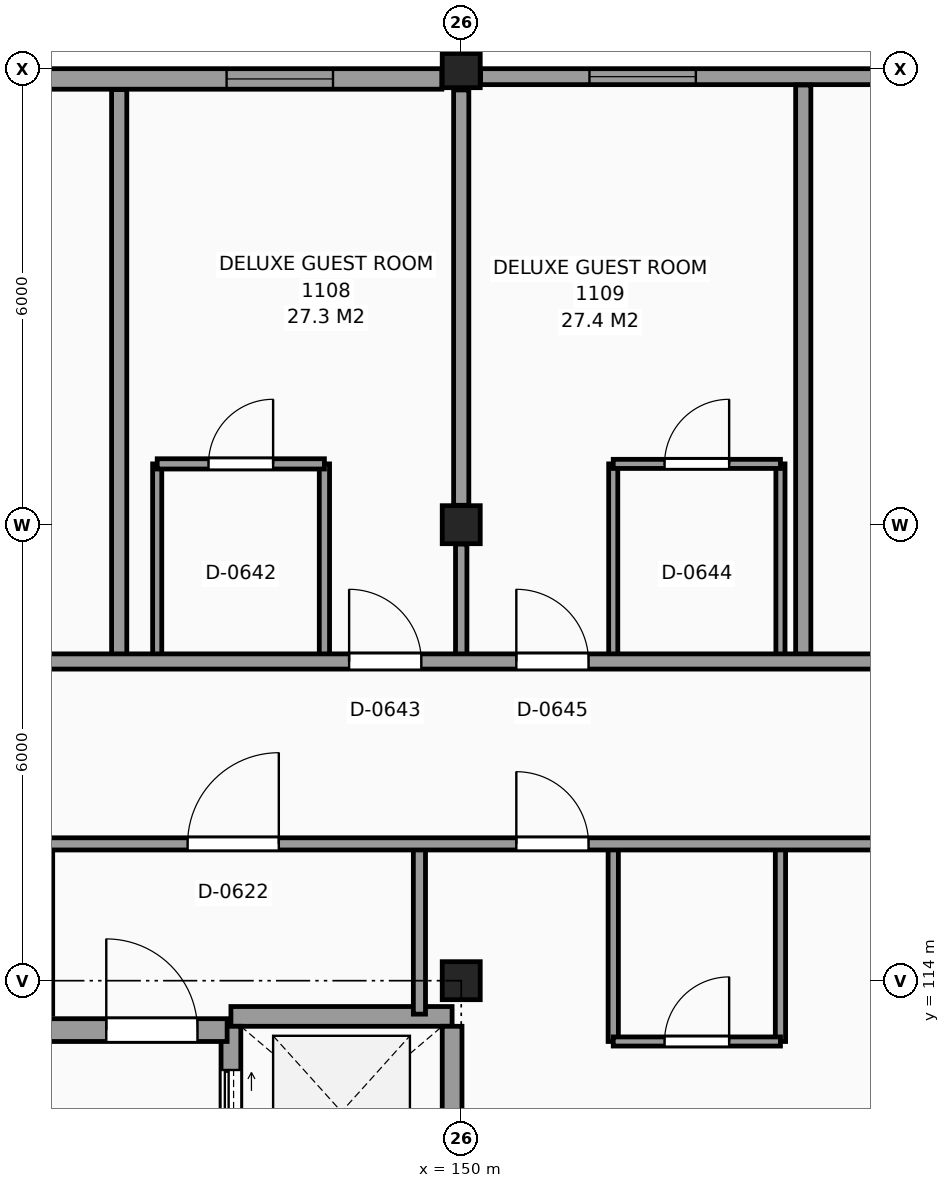
"""IFC4 building model, lengths in metres.
Left out: names, types, materials, properties, quantities, classifications, styles, units other than length and angle.
Written with IfcOpenShell. Run it as: python <this file> out.ifc"""

import sys

from ifc_helpers import new_model, si_unit, direction, frame, frame_2d, origin, origin_2d, place, context, subcontext, project, spatial, rectangle, extrude, element, fill, save


model = new_model("IFC4")
c1 = context("Model", 3, precision=1e-05, world=origin(), true_north=direction((0.0, 1.0)))
c2 = subcontext(c1, "Body", "Model", "MODEL_VIEW")
j1 = project(units=[si_unit("LENGTHUNIT", "METRE"), si_unit("PLANEANGLEUNIT", "RADIAN")], contexts=[c1])
p1 = place(None, origin())
s1 = spatial("IfcSite", under=j1, at=p1, CompositionType="ELEMENT")
p2 = place(p1, origin())
s2 = spatial("IfcBuilding", under=s1, at=p2, CompositionType="ELEMENT")
p3 = place(p2, frame((0.0, 0.0, 44.7)))
s3 = spatial("IfcBuildingStorey", under=s2, at=p3, CompositionType="ELEMENT", Elevation=44.7)
for number, where, z_axis, x_axis in (
    (1, (150.0, 114.0, 0.0), (0.0, 0.0, 1.0), (1.0, 0.0, 0.0)),
    (2, (150.0, 120.0, 0.0), (0.0, 0.0, 1.0), (1.0, 0.0, 0.0)),
    (3, (150.0, 126.0, 0.0), (0.0, 0.0, 1.0), (1.0, 0.0, 0.0)),
):
    element("IfcColumn", number, at=place(p3, frame(where, z_axis=z_axis, x_axis=x_axis)), inside=s3, PredefinedType="COLUMN", context=c2, shape_type="SweptSolid", body=[
        extrude(rectangle(XDim=0.5, YDim=0.5, at=origin_2d()), origin(), (0.0, 0.0, 1.0), 3.3),
    ])
p4 = place(p3, frame((155.745, 125.895, 0.0), z_axis=(0.0, 0.0, 1.0), x_axis=(-1.0, 0.0, 0.0)))
e4 = element("IfcWall", 4, at=p4, inside=s3, PredefinedType="SOLIDWALL", context=c2, shape_type="SweptSolid", body=[
    extrude(rectangle(XDim=5.49, YDim=0.21, at=frame_2d((2.745, 0.0))), origin(), (0.0, 0.0, 1.0), 2.4),
])
p5 = place(p4, frame((2.658, 0.0, 0.8)))
e5 = element("IfcOpeningElement", 5, at=p5, cuts=e4, PredefinedType="OPENING", context=c2, shape_type="SweptSolid", body=[
    extrude(rectangle(XDim=1.4, YDim=1.4, at=frame_2d((0.7, 0.7))), frame((0.0, 0.115, 0.0), z_axis=(0.0, -1.0, 0.0), x_axis=(1.0, 0.0, 0.0)), (0.0, 0.0, 1.0), 0.23),
])
p6 = place(p3, frame((149.745, 125.865, 0.0), z_axis=(0.0, 0.0, 1.0), x_axis=(-1.0, 0.0, 0.0)))
e6 = element("IfcWall", 6, at=p6, inside=s3, PredefinedType="SOLIDWALL", context=c2, shape_type="SweptSolid", body=[
    extrude(rectangle(XDim=5.49, YDim=0.27, at=frame_2d((2.745, 0.0))), origin(), (0.0, 0.0, 1.0), 2.4),
])
p7 = place(p6, frame((1.432, 0.0, 0.8)))
e7 = element("IfcOpeningElement", 7, at=p7, cuts=e6, PredefinedType="OPENING", context=c2, shape_type="SweptSolid", body=[
    extrude(rectangle(XDim=1.4, YDim=1.4, at=frame_2d((0.7, 0.7))), frame((0.0, 0.145, 0.0), z_axis=(0.0, -1.0, 0.0), x_axis=(1.0, 0.0, 0.0)), (0.0, 0.0, 1.0), 0.29),
])
p8 = place(p3, frame((146.97, 113.53, 0.0), z_axis=(0.0, 0.0, 1.0), x_axis=(1.0, 0.0, 0.0)))
e8 = element("IfcWall", 8, at=p8, inside=s3, PredefinedType="SHEAR", context=c2, shape_type="SweptSolid", body=[
    extrude(rectangle(XDim=2.91, YDim=0.26, at=frame_2d((1.455, 0.0))), origin(), (0.0, 0.0, 1.0), 3.3),
])
p9 = place(p3, frame((149.88, 111.15, 0.0), z_axis=(0.0, 0.0, 1.0), x_axis=(0.0, 1.0, 0.0)))
e9 = element("IfcWall", 9, at=p9, inside=s3, PredefinedType="SHEAR", context=c2, shape_type="SweptSolid", body=[
    extrude(rectangle(XDim=2.25, YDim=0.26, at=frame_2d((1.125, 0.0))), origin(), (0.0, 0.0, 1.0), 3.3),
])
p10 = place(p3, frame((146.97, 111.15, 0.0), z_axis=(0.0, 0.0, 1.0), x_axis=(0.0, 1.0, 0.0)))
e10 = element("IfcWall", 10, at=p10, inside=s3, PredefinedType="SHEAR", context=c2, shape_type="SweptSolid", body=[
    extrude(rectangle(XDim=2.25, YDim=0.26, at=frame_2d((1.125, 0.0))), origin(), (0.0, 0.0, 1.0), 3.3),
])
p11 = place(p10, frame((0.575, 0.0, 0.0)))
e11 = element("IfcOpeningElement", 11, at=p11, cuts=e10, PredefinedType="OPENING", context=c2, shape_type="SweptSolid", body=[
    extrude(rectangle(XDim=1.1, YDim=2.2, at=frame_2d((0.55, 1.1))), frame((0.0, 0.14, 0.0), z_axis=(0.0, -1.0, 0.0), x_axis=(1.0, 0.0, 0.0)), (0.0, 0.0, 1.0), 0.28),
])
p12 = place(p3, frame((142.68, 113.35, 0.0), z_axis=(0.0, 0.0, 1.0), x_axis=(1.0, 0.0, 0.0)))
e12 = element("IfcWall", 12, at=p12, inside=s3, PredefinedType="SHEAR", context=c2, shape_type="SweptSolid", body=[
    extrude(rectangle(XDim=4.24, YDim=0.3, at=frame_2d((2.12, 0.0))), origin(), (0.0, 0.0, 1.0), 3.3),
])
p13 = place(p12, frame((2.65, 0.0, 0.0)))
e13 = element("IfcOpeningElement", 13, at=p13, cuts=e12, PredefinedType="OPENING", context=c2, shape_type="SweptSolid", body=[
    extrude(rectangle(XDim=1.2, YDim=2.2, at=frame_2d((0.6, 1.1))), frame((0.0, 0.16, 0.0), z_axis=(0.0, -1.0, 0.0), x_axis=(1.0, 0.0, 0.0)), (0.0, 0.0, 1.0), 0.32),
])
p14 = place(p3, frame((144.55, 113.56, 0.0), z_axis=(0.0, 0.0, 1.0), x_axis=(0.0, 1.0, 0.0)))
e14 = element("IfcWall", 14, at=p14, inside=s3, PredefinedType="PARTITIONING", context=c2, shape_type="SweptSolid", body=[
    extrude(rectangle(XDim=2.24, YDim=0.15, at=frame_2d((1.12, 0.0))), origin(), (0.0, 0.0, 1.0), 3.05),
])
p15 = place(p3, frame((145.5, 118.2, 0.0), z_axis=(0.0, 0.0, 1.0), x_axis=(0.0, 1.0, 0.0)))
e15 = element("IfcWall", 15, at=p15, inside=s3, PredefinedType="PARTITIONING", context=c2, shape_type="SweptSolid", body=[
    extrude(rectangle(XDim=7.525, YDim=0.2, at=frame_2d((3.763, 0.0))), origin(), (0.0, 0.0, 1.0), 3.05),
])
p16 = place(p3, frame((146.0, 118.2, 0.0), z_axis=(0.0, 0.0, 1.0), x_axis=(0.0, 1.0, 0.0)))
e16 = element("IfcWall", 16, at=p16, inside=s3, PredefinedType="PARTITIONING", context=c2, shape_type="SweptSolid", body=[
    extrude(rectangle(XDim=2.6, YDim=0.12, at=frame_2d((1.3, 0.0))), origin(), (0.0, 0.0, 1.0), 3.05),
])
p17 = place(p3, frame((148.2, 118.2, 0.0), z_axis=(0.0, 0.0, 1.0), x_axis=(0.0, 1.0, 0.0)))
e17 = element("IfcWall", 17, at=p17, inside=s3, PredefinedType="PARTITIONING", context=c2, shape_type="SweptSolid", body=[
    extrude(rectangle(XDim=2.6, YDim=0.135, at=frame_2d((1.3, 0.0))), origin(), (0.0, 0.0, 1.0), 3.05),
])
p18 = place(p3, frame((149.45, 113.56, 0.0), z_axis=(0.0, 0.0, 1.0), x_axis=(0.0, 1.0, 0.0)))
e18 = element("IfcWall", 18, at=p18, inside=s3, PredefinedType="PARTITIONING", context=c2, shape_type="SweptSolid", body=[
    extrude(rectangle(XDim=2.24, YDim=0.16, at=frame_2d((1.12, 0.0))), origin(), (0.0, 0.0, 1.0), 3.05),
])
p19 = place(p3, frame((150.0, 118.2, 0.0), z_axis=(0.0, 0.0, 1.0), x_axis=(0.0, 1.0, 0.0)))
e19 = element("IfcWall", 19, at=p19, inside=s3, PredefinedType="PARTITIONING", context=c2, shape_type="SweptSolid", body=[
    extrude(rectangle(XDim=1.545, YDim=0.15, at=frame_2d((0.772, 0.0))), origin(), (0.0, 0.0, 1.0), 2.35),
])
p20 = place(p3, frame((150.0, 120.255, 0.0), z_axis=(0.0, 0.0, 1.0), x_axis=(0.0, 1.0, 0.0)))
e20 = element("IfcWall", 20, at=p20, inside=s3, PredefinedType="PARTITIONING", context=c2, shape_type="SweptSolid", body=[
    extrude(rectangle(XDim=5.465, YDim=0.2, at=frame_2d((2.732, 0.0))), origin(), (0.0, 0.0, 1.0), 2.5),
])
p21 = place(p3, frame((152.0, 113.2, 0.0), z_axis=(0.0, 0.0, 1.0), x_axis=(0.0, 1.0, 0.0)))
e21 = element("IfcWall", 21, at=p21, inside=s3, PredefinedType="PARTITIONING", context=c2, shape_type="SweptSolid", body=[
    extrude(rectangle(XDim=2.6, YDim=0.135, at=frame_2d((1.3, 0.0))), origin(), (0.0, 0.0, 1.0), 3.05),
])
p22 = place(p3, frame((152.0, 118.2, 0.0), z_axis=(0.0, 0.0, 1.0), x_axis=(0.0, 1.0, 0.0)))
e22 = element("IfcWall", 22, at=p22, inside=s3, PredefinedType="PARTITIONING", context=c2, shape_type="SweptSolid", body=[
    extrude(rectangle(XDim=2.6, YDim=0.12, at=frame_2d((1.3, 0.0))), origin(), (0.0, 0.0, 1.0), 3.05),
])
p23 = place(p3, frame((154.2, 113.2, 0.0), z_axis=(0.0, 0.0, 1.0), x_axis=(0.0, 1.0, 0.0)))
e23 = element("IfcWall", 23, at=p23, inside=s3, PredefinedType="PARTITIONING", context=c2, shape_type="SweptSolid", body=[
    extrude(rectangle(XDim=2.6, YDim=0.135, at=frame_2d((1.3, 0.0))), origin(), (0.0, 0.0, 1.0), 3.05),
])
p24 = place(p3, frame((154.2, 118.2, 0.0), z_axis=(0.0, 0.0, 1.0), x_axis=(0.0, 1.0, 0.0)))
e24 = element("IfcWall", 24, at=p24, inside=s3, PredefinedType="PARTITIONING", context=c2, shape_type="SweptSolid", body=[
    extrude(rectangle(XDim=2.6, YDim=0.12, at=frame_2d((1.3, 0.0))), origin(), (0.0, 0.0, 1.0), 3.05),
])
p25 = place(p3, frame((154.5, 118.2, 0.0), z_axis=(0.0, 0.0, 1.0), x_axis=(0.0, 1.0, 0.0)))
e25 = element("IfcWall", 25, at=p25, inside=s3, PredefinedType="PARTITIONING", context=c2, shape_type="SweptSolid", body=[
    extrude(rectangle(XDim=7.585, YDim=0.2, at=frame_2d((3.792, 0.0))), origin(), (0.0, 0.0, 1.0), 3.05),
])
p26 = place(p3, frame((152.0, 113.2, 0.0), z_axis=(0.0, 0.0, 1.0), x_axis=(1.0, 0.0, 0.0)))
e26 = element("IfcWall", 26, at=p26, inside=s3, PredefinedType="PARTITIONING", context=c2, shape_type="SweptSolid", body=[
    extrude(rectangle(XDim=2.2, YDim=0.12, at=frame_2d((1.1, 0.0))), origin(), (0.0, 0.0, 1.0), 3.05),
])
p27 = place(p26, frame((0.675, 0.0, 0.0)))
e27 = element("IfcOpeningElement", 27, at=p27, cuts=e26, PredefinedType="OPENING", context=c2, shape_type="SweptSolid", body=[
    extrude(rectangle(XDim=0.85, YDim=2.1, at=frame_2d((0.425, 1.05))), frame((0.0, 0.07, 0.0), z_axis=(0.0, -1.0, 0.0), x_axis=(1.0, 0.0, 0.0)), (0.0, 0.0, 1.0), 0.14),
])
p28 = place(p3, frame((102.255, 115.8, 0.0), z_axis=(0.0, 0.0, 1.0), x_axis=(1.0, 0.0, 0.0)))
e28 = element("IfcWall", 28, at=p28, inside=s3, PredefinedType="PARTITIONING", context=c2, shape_type="SweptSolid", body=[
    extrude(rectangle(XDim=67.545, YDim=0.16, at=frame_2d((33.772, 0.0))), origin(), (0.0, 0.0, 1.0), 3.05),
])
p29 = place(p28, frame((44.145, 0.0, 0.0)))
e29 = element("IfcOpeningElement", 29, at=p29, cuts=e28, PredefinedType="OPENING", context=c2, shape_type="SweptSolid", body=[
    extrude(rectangle(XDim=1.2, YDim=2.2, at=frame_2d((0.6, 1.1))), frame((0.0, 0.09, 0.0), z_axis=(0.0, -1.0, 0.0), x_axis=(1.0, 0.0, 0.0)), (0.0, 0.0, 1.0), 0.18),
])
p30 = place(p28, frame((14.145, 0.0, 0.0)))
e30 = element("IfcOpeningElement", 30, at=p30, cuts=e28, PredefinedType="OPENING", context=c2, shape_type="SweptSolid", body=[
    extrude(rectangle(XDim=1.2, YDim=2.2, at=frame_2d((0.6, 1.1))), frame((0.0, 0.09, 0.0), z_axis=(0.0, -1.0, 0.0), x_axis=(1.0, 0.0, 0.0)), (0.0, 0.0, 1.0), 0.18),
])
p31 = place(p28, frame((19.295, 0.0, 0.0)))
e31 = element("IfcOpeningElement", 31, at=p31, cuts=e28, PredefinedType="OPENING", context=c2, shape_type="SweptSolid", body=[
    extrude(rectangle(XDim=1.0, YDim=2.15, at=frame_2d((0.5, 1.075))), frame((0.0, 0.09, 0.0), z_axis=(0.0, -1.0, 0.0), x_axis=(1.0, 0.0, 0.0)), (0.0, 0.0, 1.0), 0.18),
])
p32 = place(p28, frame((26.265, 0.0, 0.0)))
e32 = element("IfcOpeningElement", 32, at=p32, cuts=e28, PredefinedType="OPENING", context=c2, shape_type="SweptSolid", body=[
    extrude(rectangle(XDim=0.96, YDim=2.15, at=frame_2d((0.48, 1.075))), frame((0.0, 0.09, 0.0), z_axis=(0.0, -1.0, 0.0), x_axis=(1.0, 0.0, 0.0)), (0.0, 0.0, 1.0), 0.18),
])
p33 = place(p28, frame((48.47, 0.0, 0.0)))
e33 = element("IfcOpeningElement", 33, at=p33, cuts=e28, PredefinedType="OPENING", context=c2, shape_type="SweptSolid", body=[
    extrude(rectangle(XDim=0.95, YDim=2.1, at=frame_2d((0.475, 1.05))), frame((0.0, 0.09, 0.0), z_axis=(0.0, -1.0, 0.0), x_axis=(1.0, 0.0, 0.0)), (0.0, 0.0, 1.0), 0.18),
])
p34 = place(p3, frame((102.255, 118.2, 0.0), z_axis=(0.0, 0.0, 1.0), x_axis=(1.0, 0.0, 0.0)))
e34 = element("IfcWall", 34, at=p34, inside=s3, PredefinedType="PARTITIONING", context=c2, shape_type="SweptSolid", body=[
    extrude(rectangle(XDim=74.245, YDim=0.2, at=frame_2d((37.123, 0.0))), origin(), (0.0, 0.0, 1.0), 3.05),
])
p35 = place(p34, frame((0.47, 0.0, 0.0)))
e35 = element("IfcOpeningElement", 35, at=p35, cuts=e34, PredefinedType="OPENING", context=c2, shape_type="SweptSolid", body=[
    extrude(rectangle(XDim=0.95, YDim=2.1, at=frame_2d((0.475, 1.05))), frame((0.0, 0.11, 0.0), z_axis=(0.0, -1.0, 0.0), x_axis=(1.0, 0.0, 0.0)), (0.0, 0.0, 1.0), 0.22),
])
p36 = place(p34, frame((4.87, 0.0, 0.0)))
e36 = element("IfcOpeningElement", 36, at=p36, cuts=e34, PredefinedType="OPENING", context=c2, shape_type="SweptSolid", body=[
    extrude(rectangle(XDim=0.95, YDim=2.1, at=frame_2d((0.475, 1.05))), frame((0.0, 0.11, 0.0), z_axis=(0.0, -1.0, 0.0), x_axis=(1.0, 0.0, 0.0)), (0.0, 0.0, 1.0), 0.22),
])
p37 = place(p34, frame((12.07, 0.0, 0.0)))
e37 = element("IfcOpeningElement", 37, at=p37, cuts=e34, PredefinedType="OPENING", context=c2, shape_type="SweptSolid", body=[
    extrude(rectangle(XDim=0.95, YDim=2.1, at=frame_2d((0.475, 1.05))), frame((0.0, 0.11, 0.0), z_axis=(0.0, -1.0, 0.0), x_axis=(1.0, 0.0, 0.0)), (0.0, 0.0, 1.0), 0.22),
])
p38 = place(p34, frame((16.27, 0.0, 0.0)))
e38 = element("IfcOpeningElement", 38, at=p38, cuts=e34, PredefinedType="OPENING", context=c2, shape_type="SweptSolid", body=[
    extrude(rectangle(XDim=0.95, YDim=2.1, at=frame_2d((0.475, 1.05))), frame((0.0, 0.11, 0.0), z_axis=(0.0, -1.0, 0.0), x_axis=(1.0, 0.0, 0.0)), (0.0, 0.0, 1.0), 0.22),
])
p39 = place(p34, frame((25.57, 0.0, 0.0)))
e39 = element("IfcOpeningElement", 39, at=p39, cuts=e34, PredefinedType="OPENING", context=c2, shape_type="SweptSolid", body=[
    extrude(rectangle(XDim=0.95, YDim=2.1, at=frame_2d((0.475, 1.05))), frame((0.0, 0.11, 0.0), z_axis=(0.0, -1.0, 0.0), x_axis=(1.0, 0.0, 0.0)), (0.0, 0.0, 1.0), 0.22),
])
p40 = place(p34, frame((30.07, 0.0, 0.0)))
e40 = element("IfcOpeningElement", 40, at=p40, cuts=e34, PredefinedType="OPENING", context=c2, shape_type="SweptSolid", body=[
    extrude(rectangle(XDim=0.95, YDim=2.1, at=frame_2d((0.475, 1.05))), frame((0.0, 0.11, 0.0), z_axis=(0.0, -1.0, 0.0), x_axis=(1.0, 0.0, 0.0)), (0.0, 0.0, 1.0), 0.22),
])
p41 = place(p34, frame((38.32, 0.0, 0.0)))
e41 = element("IfcOpeningElement", 41, at=p41, cuts=e34, PredefinedType="OPENING", context=c2, shape_type="SweptSolid", body=[
    extrude(rectangle(XDim=0.95, YDim=2.1, at=frame_2d((0.475, 1.05))), frame((0.0, 0.11, 0.0), z_axis=(0.0, -1.0, 0.0), x_axis=(1.0, 0.0, 0.0)), (0.0, 0.0, 1.0), 0.22),
])
p42 = place(p34, frame((46.27, 0.0, 0.0)))
e42 = element("IfcOpeningElement", 42, at=p42, cuts=e34, PredefinedType="OPENING", context=c2, shape_type="SweptSolid", body=[
    extrude(rectangle(XDim=0.95, YDim=2.1, at=frame_2d((0.475, 1.05))), frame((0.0, 0.11, 0.0), z_axis=(0.0, -1.0, 0.0), x_axis=(1.0, 0.0, 0.0)), (0.0, 0.0, 1.0), 0.22),
])
p43 = place(p34, frame((48.47, 0.0, 0.0)))
e43 = element("IfcOpeningElement", 43, at=p43, cuts=e34, PredefinedType="OPENING", context=c2, shape_type="SweptSolid", body=[
    extrude(rectangle(XDim=0.95, YDim=2.1, at=frame_2d((0.475, 1.05))), frame((0.0, 0.11, 0.0), z_axis=(0.0, -1.0, 0.0), x_axis=(1.0, 0.0, 0.0)), (0.0, 0.0, 1.0), 0.22),
])
p44 = place(p34, frame((54.47, 0.0, 0.0)))
e44 = element("IfcOpeningElement", 44, at=p44, cuts=e34, PredefinedType="OPENING", context=c2, shape_type="SweptSolid", body=[
    extrude(rectangle(XDim=0.95, YDim=2.1, at=frame_2d((0.475, 1.05))), frame((0.0, 0.11, 0.0), z_axis=(0.0, -1.0, 0.0), x_axis=(1.0, 0.0, 0.0)), (0.0, 0.0, 1.0), 0.22),
])
p45 = place(p34, frame((64.27, 0.0, 0.0)))
e45 = element("IfcOpeningElement", 45, at=p45, cuts=e34, PredefinedType="OPENING", context=c2, shape_type="SweptSolid", body=[
    extrude(rectangle(XDim=0.95, YDim=2.1, at=frame_2d((0.475, 1.05))), frame((0.0, 0.11, 0.0), z_axis=(0.0, -1.0, 0.0), x_axis=(1.0, 0.0, 0.0)), (0.0, 0.0, 1.0), 0.22),
])
p46 = place(p34, frame((68.22, 0.0, 0.0)))
e46 = element("IfcOpeningElement", 46, at=p46, cuts=e34, PredefinedType="OPENING", context=c2, shape_type="SweptSolid", body=[
    extrude(rectangle(XDim=0.95, YDim=2.1, at=frame_2d((0.475, 1.05))), frame((0.0, 0.11, 0.0), z_axis=(0.0, -1.0, 0.0), x_axis=(1.0, 0.0, 0.0)), (0.0, 0.0, 1.0), 0.22),
])
p47 = place(p3, frame((146.0, 120.8, 0.0), z_axis=(0.0, 0.0, 1.0), x_axis=(1.0, 0.0, 0.0)))
e47 = element("IfcWall", 47, at=p47, inside=s3, PredefinedType="PARTITIONING", context=c2, shape_type="SweptSolid", body=[
    extrude(rectangle(XDim=2.2, YDim=0.135, at=frame_2d((1.1, 0.0))), origin(), (0.0, 0.0, 1.0), 3.05),
])
p48 = place(p47, frame((0.675, 0.0, 0.0)))
e48 = element("IfcOpeningElement", 48, at=p48, cuts=e47, PredefinedType="OPENING", context=c2, shape_type="SweptSolid", body=[
    extrude(rectangle(XDim=0.85, YDim=2.1, at=frame_2d((0.425, 1.05))), frame((0.0, 0.078, 0.0), z_axis=(0.0, -1.0, 0.0), x_axis=(1.0, 0.0, 0.0)), (0.0, 0.0, 1.0), 0.155),
])
p49 = place(p3, frame((152.0, 120.8, 0.0), z_axis=(0.0, 0.0, 1.0), x_axis=(1.0, 0.0, 0.0)))
e49 = element("IfcWall", 49, at=p49, inside=s3, PredefinedType="PARTITIONING", context=c2, shape_type="SweptSolid", body=[
    extrude(rectangle(XDim=2.2, YDim=0.12, at=frame_2d((1.1, 0.0))), origin(), (0.0, 0.0, 1.0), 3.05),
])
p50 = place(p49, frame((0.675, 0.0, 0.0)))
e50 = element("IfcOpeningElement", 50, at=p50, cuts=e49, PredefinedType="OPENING", context=c2, shape_type="SweptSolid", body=[
    extrude(rectangle(XDim=0.85, YDim=2.1, at=frame_2d((0.425, 1.05))), frame((0.0, 0.07, 0.0), z_axis=(0.0, -1.0, 0.0), x_axis=(1.0, 0.0, 0.0)), (0.0, 0.0, 1.0), 0.14),
])
p51 = place(p7, origin())
e51 = element("IfcWindow", 51, at=p51, inside=s3, PartitioningType="SINGLE_PANEL", PredefinedType="WINDOW", context=c2, shape_type="SweptSolid", body=[
    extrude(rectangle(XDim=1.4, YDim=1.4, at=frame_2d((0.7, 0.7))), frame((0.0, 0.03, 0.0), z_axis=(0.0, -1.0, 0.0), x_axis=(1.0, 0.0, 0.0)), (0.0, 0.0, 1.0), 0.06),
])
fill(e7, e51)
p52 = place(p5, origin())
e52 = element("IfcWindow", 52, at=p52, inside=s3, PartitioningType="SINGLE_PANEL", PredefinedType="WINDOW", context=c2, shape_type="SweptSolid", body=[
    extrude(rectangle(XDim=1.4, YDim=1.4, at=frame_2d((0.7, 0.7))), frame((0.0, 0.03, 0.0), z_axis=(0.0, -1.0, 0.0), x_axis=(1.0, 0.0, 0.0)), (0.0, 0.0, 1.0), 0.06),
])
fill(e5, e52)
p53 = place(p11, origin())
e53 = element("IfcDoor", 53, at=p53, inside=s3, OperationType="DOUBLE_DOOR_SLIDING", PredefinedType="DOOR", context=c2, shape_type="SweptSolid", body=[
    extrude(rectangle(XDim=1.1, YDim=2.2, at=frame_2d((0.55, 1.1))), frame((0.0, 0.025, 0.0), z_axis=(0.0, -1.0, 0.0), x_axis=(1.0, 0.0, 0.0)), (0.0, 0.0, 1.0), 0.05),
])
fill(e11, e53)
p54 = place(p13, origin())
e54 = element("IfcDoor", 54, at=p54, inside=s3, OperationType="SINGLE_SWING_LEFT", PredefinedType="DOOR", context=c2, shape_type="SweptSolid", body=[
    extrude(rectangle(XDim=1.2, YDim=2.2, at=frame_2d((0.6, 1.1))), frame((0.0, 0.025, 0.0), z_axis=(0.0, -1.0, 0.0), x_axis=(1.0, 0.0, 0.0)), (0.0, 0.0, 1.0), 0.05),
])
fill(e13, e54)
p55 = place(p29, origin())
e55 = element("IfcDoor", 55, at=p55, inside=s3, OperationType="SINGLE_SWING_RIGHT", PredefinedType="DOOR", context=c2, shape_type="SweptSolid", body=[
    extrude(rectangle(XDim=1.2, YDim=2.2, at=frame_2d((0.6, 1.1))), frame((0.0, 0.025, 0.0), z_axis=(0.0, -1.0, 0.0), x_axis=(1.0, 0.0, 0.0)), (0.0, 0.0, 1.0), 0.05),
])
fill(e29, e55)
p56 = place(p48, origin())
e56 = element("IfcDoor", 56, at=p56, inside=s3, OperationType="SINGLE_SWING_RIGHT", PredefinedType="DOOR", context=c2, shape_type="SweptSolid", body=[
    extrude(rectangle(XDim=0.85, YDim=2.1, at=frame_2d((0.425, 1.05))), frame((0.0, 0.025, 0.0), z_axis=(0.0, -1.0, 0.0), x_axis=(1.0, 0.0, 0.0)), (0.0, 0.0, 1.0), 0.05),
])
fill(e48, e56)
p57 = place(p42, origin())
e57 = element("IfcDoor", 57, at=p57, inside=s3, OperationType="SINGLE_SWING_LEFT", PredefinedType="DOOR", context=c2, shape_type="SweptSolid", body=[
    extrude(rectangle(XDim=0.95, YDim=2.1, at=frame_2d((0.475, 1.05))), frame((0.0, 0.025, 0.0), z_axis=(0.0, -1.0, 0.0), x_axis=(1.0, 0.0, 0.0)), (0.0, 0.0, 1.0), 0.05),
])
fill(e42, e57)
p58 = place(p50, origin())
e58 = element("IfcDoor", 58, at=p58, inside=s3, OperationType="SINGLE_SWING_RIGHT", PredefinedType="DOOR", context=c2, shape_type="SweptSolid", body=[
    extrude(rectangle(XDim=0.85, YDim=2.1, at=frame_2d((0.425, 1.05))), frame((0.0, 0.025, 0.0), z_axis=(0.0, -1.0, 0.0), x_axis=(1.0, 0.0, 0.0)), (0.0, 0.0, 1.0), 0.05),
])
fill(e50, e58)
p59 = place(p43, origin())
e59 = element("IfcDoor", 59, at=p59, inside=s3, OperationType="SINGLE_SWING_LEFT", PredefinedType="DOOR", context=c2, shape_type="SweptSolid", body=[
    extrude(rectangle(XDim=0.95, YDim=2.1, at=frame_2d((0.475, 1.05))), frame((0.0, 0.025, 0.0), z_axis=(0.0, -1.0, 0.0), x_axis=(1.0, 0.0, 0.0)), (0.0, 0.0, 1.0), 0.05),
])
fill(e43, e59)
p60 = place(p27, origin())
e60 = element("IfcDoor", 60, at=p60, inside=s3, OperationType="SINGLE_SWING_RIGHT", PredefinedType="DOOR", context=c2, shape_type="SweptSolid", body=[
    extrude(rectangle(XDim=0.85, YDim=2.1, at=frame_2d((0.425, 1.05))), frame((0.0, 0.025, 0.0), z_axis=(0.0, -1.0, 0.0), x_axis=(1.0, 0.0, 0.0)), (0.0, 0.0, 1.0), 0.05),
])
fill(e27, e60)
p61 = place(p33, origin())
e61 = element("IfcDoor", 61, at=p61, inside=s3, OperationType="SINGLE_SWING_LEFT", PredefinedType="DOOR", context=c2, shape_type="SweptSolid", body=[
    extrude(rectangle(XDim=0.95, YDim=2.1, at=frame_2d((0.475, 1.05))), frame((0.0, 0.025, 0.0), z_axis=(0.0, -1.0, 0.0), x_axis=(1.0, 0.0, 0.0)), (0.0, 0.0, 1.0), 0.05),
])
fill(e33, e61)
save(model, sys.argv[1])
